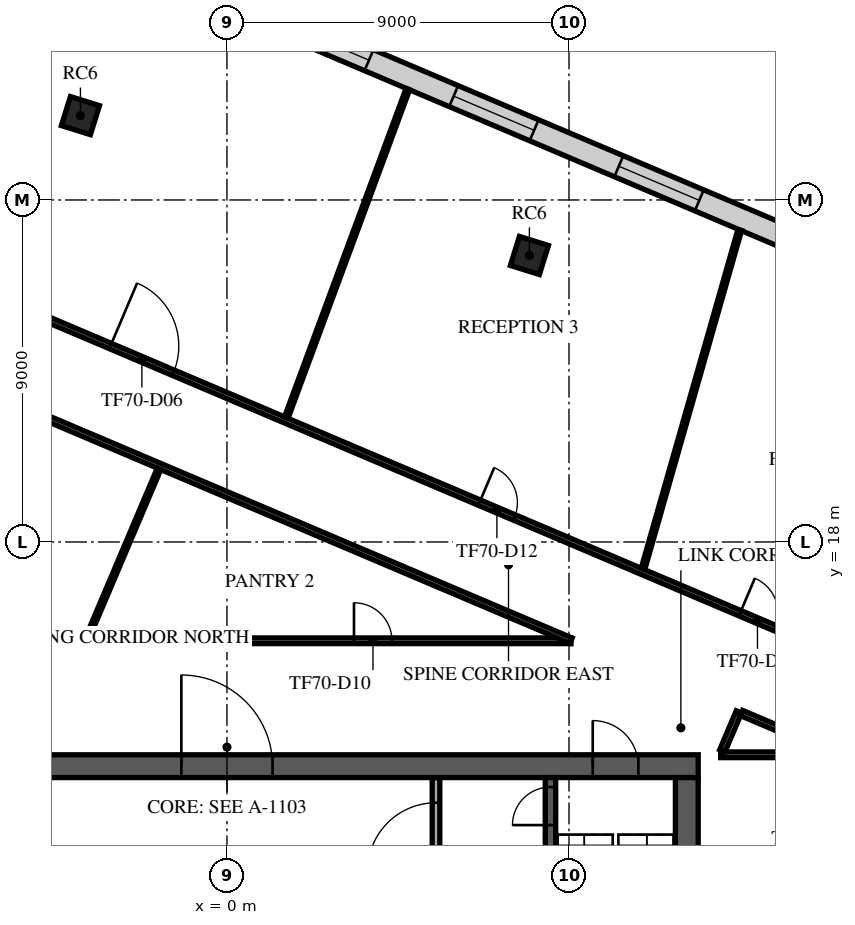
"""IFC4 building model, lengths in metres.
Left out: names, types, materials, properties, quantities, classifications, styles, units other than length and angle.
Written with IfcOpenShell. Run it as: python <this file> out.ifc"""

import sys

from ifc_helpers import new_model, si_unit, direction, frame, frame_2d, origin, origin_2d, place, context, subcontext, project, spatial, rectangle, extrude, element, fill, save


model = new_model("IFC4")
c1 = context("Model", 3, precision=1e-05, world=origin(), true_north=direction((0.0, 1.0)))
c2 = subcontext(c1, "Body", "Model", "MODEL_VIEW")
j1 = project(units=[si_unit("LENGTHUNIT", "METRE"), si_unit("PLANEANGLEUNIT", "RADIAN")], contexts=[c1])
p1 = place(None, origin())
s1 = spatial("IfcSite", under=j1, at=p1, CompositionType="ELEMENT")
p2 = place(p1, origin())
s2 = spatial("IfcBuilding", under=s1, at=p2, CompositionType="ELEMENT")
p3 = place(p2, frame((0.0, 0.0, 300.5)))
s3 = spatial("IfcBuildingStorey", under=s2, at=p3, CompositionType="ELEMENT", Elevation=300.5)
for number, where, z_axis, x_axis in (
    (1, (7.958, 25.539, 0.0), (0.0, 0.0, 1.0), (0.298, 0.955, 0.0)),
    (2, (-3.856, 29.22, 0.0), (0.0, 0.0, 1.0), (0.298, 0.955, 0.0)),
):
    element("IfcColumn", number, at=place(p3, frame(where, z_axis=z_axis, x_axis=x_axis)), inside=s3, PredefinedType="COLUMN", context=c2, shape_type="SweptSolid", body=[
        extrude(rectangle(XDim=0.8, YDim=0.8, at=origin_2d()), origin(), (0.0, 0.0, 1.0), 4.0),
    ])
p4 = place(p3, frame((-12.4, 12.1, 0.0), z_axis=(0.0, 0.0, 1.0), x_axis=(1.0, 0.0, 0.0)))
e3 = element("IfcWall", 3, at=p4, inside=s3, PredefinedType="SHEAR", context=c2, shape_type="SweptSolid", body=[
    extrude(rectangle(XDim=24.8, YDim=0.6, at=frame_2d((12.4, 0.0))), origin(), (0.0, 0.0, 1.0), 3.65),
])
p5 = place(p4, frame((11.2, 0.0, 0.0)))
e4 = element("IfcOpeningElement", 4, at=p5, cuts=e3, PredefinedType="OPENING", context=c2, shape_type="SweptSolid", body=[
    extrude(rectangle(XDim=2.4, YDim=2.4, at=frame_2d((1.2, 1.2))), frame((0.0, 0.31, 0.0), z_axis=(0.0, -1.0, 0.0), x_axis=(1.0, 0.0, 0.0)), (0.0, 0.0, 1.0), 0.62),
])
p6 = place(p4, frame((22.025, 0.0, 0.0)))
e5 = element("IfcOpeningElement", 5, at=p6, cuts=e3, PredefinedType="OPENING", context=c2, shape_type="SweptSolid", body=[
    extrude(rectangle(XDim=1.2, YDim=2.1, at=frame_2d((0.6, 1.05))), frame((0.0, 0.31, 0.0), z_axis=(0.0, -1.0, 0.0), x_axis=(1.0, 0.0, 0.0)), (0.0, 0.0, 1.0), 0.62),
])
p7 = place(p4, frame((1.0, 0.0, 0.0)))
e6 = element("IfcOpeningElement", 6, at=p7, cuts=e3, PredefinedType="OPENING", context=c2, shape_type="SweptSolid", body=[
    extrude(rectangle(XDim=1.0, YDim=2.1, at=frame_2d((0.5, 1.05))), frame((0.0, 0.31, 0.0), z_axis=(0.0, -1.0, 0.0), x_axis=(1.0, 0.0, 0.0)), (0.0, 0.0, 1.0), 0.62),
])
p8 = place(p3, frame((12.1, -11.8, 0.0), z_axis=(0.0, 0.0, 1.0), x_axis=(0.0, 1.0, 0.0)))
e7 = element("IfcWall", 7, at=p8, inside=s3, PredefinedType="SHEAR", context=c2, shape_type="SweptSolid", body=[
    extrude(rectangle(XDim=23.6, YDim=0.6, at=frame_2d((11.8, 0.0))), origin(), (0.0, 0.0, 1.0), 3.65),
])
p9 = place(p8, frame((10.6, 0.0, 0.0)))
e8 = element("IfcOpeningElement", 8, at=p9, cuts=e7, PredefinedType="OPENING", context=c2, shape_type="SweptSolid", body=[
    extrude(rectangle(XDim=2.4, YDim=2.4, at=frame_2d((1.2, 1.2))), frame((0.0, 0.31, 0.0), z_axis=(0.0, -1.0, 0.0), x_axis=(1.0, 0.0, 0.0)), (0.0, 0.0, 1.0), 0.62),
])
p10 = place(p3, frame((8.512, 4.55, 0.0), z_axis=(0.0, 0.0, 1.0), x_axis=(0.0, 1.0, 0.0)))
e9 = element("IfcWall", 9, at=p10, inside=s3, PredefinedType="SOLIDWALL", context=c2, shape_type="SweptSolid", body=[
    extrude(rectangle(XDim=7.25, YDim=0.275, at=frame_2d((3.625, 0.0))), origin(), (0.0, 0.0, 1.0), 3.65),
])
p11 = place(p10, frame((6.0, 0.0, 0.0)))
e10 = element("IfcOpeningElement", 10, at=p11, cuts=e9, PredefinedType="OPENING", context=c2, shape_type="SweptSolid", body=[
    extrude(rectangle(XDim=1.0, YDim=2.1, at=frame_2d((0.5, 1.05))), frame((0.0, 0.147, 0.0), z_axis=(0.0, -1.0, 0.0), x_axis=(1.0, 0.0, 0.0)), (0.0, 0.0, 1.0), 0.295),
])
p12 = place(p3, frame((5.5, 8.805, 0.0), z_axis=(0.0, 0.0, 1.0), x_axis=(0.0, 1.0, 0.0)))
e11 = element("IfcWall", 11, at=p12, inside=s3, PredefinedType="PARTITIONING", context=c2, shape_type="SweptSolid", body=[
    extrude(rectangle(XDim=2.99, YDim=0.2, at=frame_2d((1.495, 0.0))), origin(), (0.0, 0.0, 1.0), 3.65),
])
p13 = place(p12, frame((0.532, 0.0, 0.0)))
e12 = element("IfcOpeningElement", 12, at=p13, cuts=e11, PredefinedType="OPENING", context=c2, shape_type="SweptSolid", body=[
    extrude(rectangle(XDim=1.8, YDim=2.1, at=frame_2d((0.9, 1.05))), frame((0.0, 0.11, 0.0), z_axis=(0.0, -1.0, 0.0), x_axis=(1.0, 0.0, 0.0)), (0.0, 0.0, 1.0), 0.22),
])
p14 = place(p3, frame((30.926, 19.138, 0.0), z_axis=(0.0, 0.0, 1.0), x_axis=(-0.920504263443, 0.390732518462, 0.0)))
e13 = element("IfcWall", 13, at=p14, inside=s3, PredefinedType="STANDARD", context=c2, shape_type="SweptSolid", body=[
    extrude(rectangle(XDim=42.49, YDim=0.6, at=frame_2d((21.245, 0.0))), origin(), (0.0, 0.0, 1.0), 3.65),
])
p15 = place(p14, frame((1.21, 0.0, 0.9)))
e14 = element("IfcOpeningElement", 14, at=p15, cuts=e13, PredefinedType="OPENING", context=c2, shape_type="SweptSolid", body=[
    extrude(rectangle(XDim=2.3, YDim=2.1, at=frame_2d((1.15, 1.05))), frame((0.0, 0.31, 0.0), z_axis=(0.0, -1.0, 0.0), x_axis=(1.0, 0.0, 0.0)), (0.0, 0.0, 1.0), 0.62),
])
p16 = place(p14, frame((5.932, 0.0, 0.9)))
e15 = element("IfcOpeningElement", 15, at=p16, cuts=e13, PredefinedType="OPENING", context=c2, shape_type="SweptSolid", body=[
    extrude(rectangle(XDim=2.3, YDim=2.1, at=frame_2d((1.15, 1.05))), frame((0.0, 0.31, 0.0), z_axis=(0.0, -1.0, 0.0), x_axis=(1.0, 0.0, 0.0)), (0.0, 0.0, 1.0), 0.62),
])
p17 = place(p14, frame((10.653, 0.0, 0.9)))
e16 = element("IfcOpeningElement", 16, at=p17, cuts=e13, PredefinedType="OPENING", context=c2, shape_type="SweptSolid", body=[
    extrude(rectangle(XDim=2.3, YDim=2.1, at=frame_2d((1.15, 1.05))), frame((0.0, 0.31, 0.0), z_axis=(0.0, -1.0, 0.0), x_axis=(1.0, 0.0, 0.0)), (0.0, 0.0, 1.0), 0.62),
])
p18 = place(p14, frame((15.374, 0.0, 0.9)))
e17 = element("IfcOpeningElement", 17, at=p18, cuts=e13, PredefinedType="OPENING", context=c2, shape_type="SweptSolid", body=[
    extrude(rectangle(XDim=2.3, YDim=2.1, at=frame_2d((1.15, 1.05))), frame((0.0, 0.31, 0.0), z_axis=(0.0, -1.0, 0.0), x_axis=(1.0, 0.0, 0.0)), (0.0, 0.0, 1.0), 0.62),
])
p19 = place(p14, frame((20.095, 0.0, 0.9)))
e18 = element("IfcOpeningElement", 18, at=p19, cuts=e13, PredefinedType="OPENING", context=c2, shape_type="SweptSolid", body=[
    extrude(rectangle(XDim=2.3, YDim=2.1, at=frame_2d((1.15, 1.05))), frame((0.0, 0.31, 0.0), z_axis=(0.0, -1.0, 0.0), x_axis=(1.0, 0.0, 0.0)), (0.0, 0.0, 1.0), 0.62),
])
p20 = place(p14, frame((24.816, 0.0, 0.9)))
e19 = element("IfcOpeningElement", 19, at=p20, cuts=e13, PredefinedType="OPENING", context=c2, shape_type="SweptSolid", body=[
    extrude(rectangle(XDim=2.3, YDim=2.1, at=frame_2d((1.15, 1.05))), frame((0.0, 0.31, 0.0), z_axis=(0.0, -1.0, 0.0), x_axis=(1.0, 0.0, 0.0)), (0.0, 0.0, 1.0), 0.62),
])
p21 = place(p14, frame((29.537, 0.0, 0.9)))
e20 = element("IfcOpeningElement", 20, at=p21, cuts=e13, PredefinedType="OPENING", context=c2, shape_type="SweptSolid", body=[
    extrude(rectangle(XDim=2.3, YDim=2.1, at=frame_2d((1.15, 1.05))), frame((0.0, 0.31, 0.0), z_axis=(0.0, -1.0, 0.0), x_axis=(1.0, 0.0, 0.0)), (0.0, 0.0, 1.0), 0.62),
])
p22 = place(p14, frame((34.258, 0.0, 0.9)))
e21 = element("IfcOpeningElement", 21, at=p22, cuts=e13, PredefinedType="OPENING", context=c2, shape_type="SweptSolid", body=[
    extrude(rectangle(XDim=2.3, YDim=2.1, at=frame_2d((1.15, 1.05))), frame((0.0, 0.31, 0.0), z_axis=(0.0, -1.0, 0.0), x_axis=(1.0, 0.0, 0.0)), (0.0, 0.0, 1.0), 0.62),
])
p23 = place(p14, frame((38.979, 0.0, 0.9)))
e22 = element("IfcOpeningElement", 22, at=p23, cuts=e13, PredefinedType="OPENING", context=c2, shape_type="SweptSolid", body=[
    extrude(rectangle(XDim=2.3, YDim=2.1, at=frame_2d((1.15, 1.05))), frame((0.0, 0.31, 0.0), z_axis=(0.0, -1.0, 0.0), x_axis=(1.0, 0.0, 0.0)), (0.0, 0.0, 1.0), 0.62),
])
p24 = place(p3, frame((-15.325, 15.4, 0.0), z_axis=(0.0, 0.0, 1.0), x_axis=(1.0, 0.0, 0.0)))
e23 = element("IfcWall", 23, at=p24, inside=s3, PredefinedType="PARTITIONING", context=c2, shape_type="SweptSolid", body=[
    extrude(rectangle(XDim=24.378, YDim=0.15, at=frame_2d((12.189, 0.0))), origin(), (0.0, 0.0, 1.0), 3.25),
])
p25 = place(p24, frame((18.667, 0.0, 0.0)))
e24 = element("IfcOpeningElement", 24, at=p25, cuts=e23, PredefinedType="OPENING", context=c2, shape_type="SweptSolid", body=[
    extrude(rectangle(XDim=1.0, YDim=2.1, at=frame_2d((0.5, 1.05))), frame((0.0, 0.085, 0.0), z_axis=(0.0, -1.0, 0.0), x_axis=(1.0, 0.0, 0.0)), (0.0, 0.0, 1.0), 0.17),
])
p26 = place(p3, frame((-9.114, 23.116, 0.0), z_axis=(0.0, 0.0, 1.0), x_axis=(0.920508047483, -0.390723603739, 0.0)))
e25 = element("IfcWall", 25, at=p26, inside=s3, PredefinedType="PARTITIONING", context=c2, shape_type="SweptSolid", body=[
    extrude(rectangle(XDim=19.737, YDim=0.15, at=frame_2d((9.868, 0.0))), origin(), (0.0, 0.0, 1.0), 3.25),
])
p27 = place(p3, frame((-8.176, 25.325, 0.0), z_axis=(0.0, 0.0, 1.0), x_axis=(0.920507643781, -0.390724554821, 0.0)))
e26 = element("IfcWall", 26, at=p27, inside=s3, PredefinedType="PARTITIONING", context=c2, shape_type="SweptSolid", body=[
    extrude(rectangle(XDim=34.917, YDim=0.15, at=frame_2d((17.458, 0.0))), origin(), (0.0, 0.0, 1.0), 3.25),
])
p28 = place(p27, frame((5.55, 0.0, 0.0)))
e27 = element("IfcOpeningElement", 27, at=p28, cuts=e26, PredefinedType="OPENING", context=c2, shape_type="SweptSolid", body=[
    extrude(rectangle(XDim=1.8, YDim=2.1, at=frame_2d((0.9, 1.05))), frame((0.0, 0.085, 0.0), z_axis=(0.0, -1.0, 0.0), x_axis=(1.0, 0.0, 0.0)), (0.0, 0.0, 1.0), 0.17),
])
p29 = place(p27, frame((1.05, 0.0, 0.0)))
e28 = element("IfcOpeningElement", 28, at=p29, cuts=e26, PredefinedType="OPENING", context=c2, shape_type="SweptSolid", body=[
    extrude(rectangle(XDim=1.0, YDim=2.1, at=frame_2d((0.5, 1.05))), frame((0.0, 0.085, 0.0), z_axis=(0.0, -1.0, 0.0), x_axis=(1.0, 0.0, 0.0)), (0.0, 0.0, 1.0), 0.17),
])
p30 = place(p27, frame((16.098, 0.0, 0.0)))
e29 = element("IfcOpeningElement", 29, at=p30, cuts=e26, PredefinedType="OPENING", context=c2, shape_type="SweptSolid", body=[
    extrude(rectangle(XDim=1.0, YDim=2.1, at=frame_2d((0.5, 1.05))), frame((0.0, 0.085, 0.0), z_axis=(0.0, -1.0, 0.0), x_axis=(1.0, 0.0, 0.0)), (0.0, 0.0, 1.0), 0.17),
])
p31 = place(p27, frame((23.547, 0.0, 0.0)))
e30 = element("IfcOpeningElement", 30, at=p31, cuts=e26, PredefinedType="OPENING", context=c2, shape_type="SweptSolid", body=[
    extrude(rectangle(XDim=1.0, YDim=2.1, at=frame_2d((0.5, 1.05))), frame((0.0, 0.085, 0.0), z_axis=(0.0, -1.0, 0.0), x_axis=(1.0, 0.0, 0.0)), (0.0, 0.0, 1.0), 0.17),
])
p32 = place(p3, frame((12.991, 12.4, 0.0), z_axis=(0.0, 0.0, 1.0), x_axis=(1.0, 0.0, 0.0)))
e31 = element("IfcWall", 31, at=p32, inside=s3, PredefinedType="PARTITIONING", context=c2, shape_type="SweptSolid", body=[
    extrude(rectangle(XDim=2.409, YDim=0.15, at=frame_2d((1.205, 0.0))), origin(), (0.0, 0.0, 1.0), 3.13),
])
p33 = place(p3, frame((13.035, 12.504, 0.0), z_axis=(0.0, 0.0, 1.0), x_axis=(0.390634335845, 0.920545933487, 0.0)))
e32 = element("IfcWall", 32, at=p33, inside=s3, PredefinedType="PARTITIONING", context=c2, shape_type="SweptSolid", body=[
    extrude(rectangle(XDim=1.113, YDim=0.15, at=frame_2d((0.557, 0.0))), origin(), (0.0, 0.0, 1.0), 3.13),
])
p34 = place(p3, frame((13.539, 13.5, 0.0), z_axis=(0.0, 0.0, 1.0), x_axis=(0.920505387388, -0.390729870613, 0.0)))
e33 = element("IfcWall", 33, at=p34, inside=s3, PredefinedType="PARTITIONING", context=c2, shape_type="SweptSolid", body=[
    extrude(rectangle(XDim=10.309, YDim=0.15, at=frame_2d((5.154, 0.0))), origin(), (0.0, 0.0, 1.0), 3.25),
])
p35 = place(p3, frame((-3.667, 15.494, 0.0), z_axis=(0.0, 0.0, 1.0), x_axis=(0.390616296151, 0.920553588435, 0.0)))
e34 = element("IfcWall", 34, at=p35, inside=s3, PredefinedType="PARTITIONING", context=c2, shape_type="SweptSolid", body=[
    extrude(rectangle(XDim=4.812, YDim=0.1, at=frame_2d((2.406, 0.0))), origin(), (0.0, 0.0, 1.0), 3.25),
])
p36 = place(p3, frame((1.562, 21.276, 0.0), z_axis=(0.0, 0.0, 1.0), x_axis=(0.346967394258, 0.937877192025, 0.0)))
e35 = element("IfcWall", 35, at=p36, inside=s3, PredefinedType="PARTITIONING", context=c2, shape_type="SweptSolid", body=[
    extrude(rectangle(XDim=9.213, YDim=0.1, at=frame_2d((4.607, 0.0))), origin(), (0.0, 0.0, 1.0), 3.25),
])
p37 = place(p3, frame((10.948, 17.296, 0.0), z_axis=(0.0, 0.0, 1.0), x_axis=(0.274428926373, 0.961607385771, 0.0)))
e36 = element("IfcWall", 36, at=p37, inside=s3, PredefinedType="PARTITIONING", context=c2, shape_type="SweptSolid", body=[
    extrude(rectangle(XDim=9.27, YDim=0.1, at=frame_2d((4.635, 0.0))), origin(), (0.0, 0.0, 1.0), 3.65),
])
p38 = place(p5, origin())
e37 = element("IfcDoor", 37, at=p38, inside=s3, OperationType="SINGLE_SWING_LEFT", PredefinedType="DOOR", context=c2, shape_type="SweptSolid", body=[
    extrude(rectangle(XDim=2.4, YDim=2.4, at=frame_2d((1.2, 1.2))), frame((0.0, 0.025, 0.0), z_axis=(0.0, -1.0, 0.0), x_axis=(1.0, 0.0, 0.0)), (0.0, 0.0, 1.0), 0.05),
])
fill(e4, e37)
p39 = place(p6, origin())
e38 = element("IfcDoor", 38, at=p39, inside=s3, OperationType="SINGLE_SWING_LEFT", PredefinedType="DOOR", context=c2, shape_type="SweptSolid", body=[
    extrude(rectangle(XDim=1.2, YDim=2.1, at=frame_2d((0.6, 1.05))), frame((0.0, 0.025, 0.0), z_axis=(0.0, -1.0, 0.0), x_axis=(1.0, 0.0, 0.0)), (0.0, 0.0, 1.0), 0.05),
])
fill(e5, e38)
p40 = place(p11, origin())
e39 = element("IfcDoor", 39, at=p40, inside=s3, OperationType="SINGLE_SWING_LEFT", PredefinedType="DOOR", context=c2, shape_type="SweptSolid", body=[
    extrude(rectangle(XDim=1.0, YDim=2.1, at=frame_2d((0.5, 1.05))), frame((0.0, 0.025, 0.0), z_axis=(0.0, -1.0, 0.0), x_axis=(1.0, 0.0, 0.0)), (0.0, 0.0, 1.0), 0.05),
])
fill(e10, e39)
p41 = place(p13, origin())
e40 = element("IfcDoor", 40, at=p41, inside=s3, OperationType="SINGLE_SWING_LEFT", PredefinedType="DOOR", context=c2, shape_type="SweptSolid", body=[
    extrude(rectangle(XDim=1.8, YDim=2.1, at=frame_2d((0.9, 1.05))), frame((0.0, 0.025, 0.0), z_axis=(0.0, -1.0, 0.0), x_axis=(1.0, 0.0, 0.0)), (0.0, 0.0, 1.0), 0.05),
])
fill(e12, e40)
p42 = place(p19, origin())
e41 = element("IfcWindow", 41, at=p42, inside=s3, PartitioningType="SINGLE_PANEL", PredefinedType="WINDOW", context=c2, shape_type="SweptSolid", body=[
    extrude(rectangle(XDim=2.3, YDim=2.1, at=frame_2d((1.15, 1.05))), frame((0.0, 0.03, 0.0), z_axis=(0.0, -1.0, 0.0), x_axis=(1.0, 0.0, 0.0)), (0.0, 0.0, 1.0), 0.06),
])
fill(e18, e41)
p43 = place(p20, origin())
e42 = element("IfcWindow", 42, at=p43, inside=s3, PartitioningType="SINGLE_PANEL", PredefinedType="WINDOW", context=c2, shape_type="SweptSolid", body=[
    extrude(rectangle(XDim=2.3, YDim=2.1, at=frame_2d((1.15, 1.05))), frame((0.0, 0.03, 0.0), z_axis=(0.0, -1.0, 0.0), x_axis=(1.0, 0.0, 0.0)), (0.0, 0.0, 1.0), 0.06),
])
fill(e19, e42)
p44 = place(p21, origin())
e43 = element("IfcWindow", 43, at=p44, inside=s3, PartitioningType="SINGLE_PANEL", PredefinedType="WINDOW", context=c2, shape_type="SweptSolid", body=[
    extrude(rectangle(XDim=2.3, YDim=2.1, at=frame_2d((1.15, 1.05))), frame((0.0, 0.03, 0.0), z_axis=(0.0, -1.0, 0.0), x_axis=(1.0, 0.0, 0.0)), (0.0, 0.0, 1.0), 0.06),
])
fill(e20, e43)
p45 = place(p28, origin())
e44 = element("IfcDoor", 44, at=p45, inside=s3, OperationType="DOUBLE_DOOR_SINGLE_SWING", PredefinedType="DOOR", context=c2, shape_type="SweptSolid", body=[
    extrude(rectangle(XDim=1.8, YDim=2.1, at=frame_2d((0.9, 1.05))), frame((0.0, 0.025, 0.0), z_axis=(0.0, -1.0, 0.0), x_axis=(1.0, 0.0, 0.0)), (0.0, 0.0, 1.0), 0.05),
])
fill(e27, e44)
p46 = place(p25, origin())
e45 = element("IfcDoor", 45, at=p46, inside=s3, OperationType="SINGLE_SWING_RIGHT", PredefinedType="DOOR", context=c2, shape_type="SweptSolid", body=[
    extrude(rectangle(XDim=1.0, YDim=2.1, at=frame_2d((0.5, 1.05))), frame((0.0, 0.025, 0.0), z_axis=(0.0, -1.0, 0.0), x_axis=(1.0, 0.0, 0.0)), (0.0, 0.0, 1.0), 0.05),
])
fill(e24, e45)
p47 = place(p30, origin())
e46 = element("IfcDoor", 46, at=p47, inside=s3, OperationType="SINGLE_SWING_RIGHT", PredefinedType="DOOR", context=c2, shape_type="SweptSolid", body=[
    extrude(rectangle(XDim=1.0, YDim=2.1, at=frame_2d((0.5, 1.05))), frame((0.0, 0.025, 0.0), z_axis=(0.0, -1.0, 0.0), x_axis=(1.0, 0.0, 0.0)), (0.0, 0.0, 1.0), 0.05),
])
fill(e29, e46)
p48 = place(p31, origin())
e47 = element("IfcDoor", 47, at=p48, inside=s3, OperationType="SINGLE_SWING_RIGHT", PredefinedType="DOOR", context=c2, shape_type="SweptSolid", body=[
    extrude(rectangle(XDim=1.0, YDim=2.1, at=frame_2d((0.5, 1.05))), frame((0.0, 0.025, 0.0), z_axis=(0.0, -1.0, 0.0), x_axis=(1.0, 0.0, 0.0)), (0.0, 0.0, 1.0), 0.05),
])
fill(e30, e47)
save(model, sys.argv[1])
